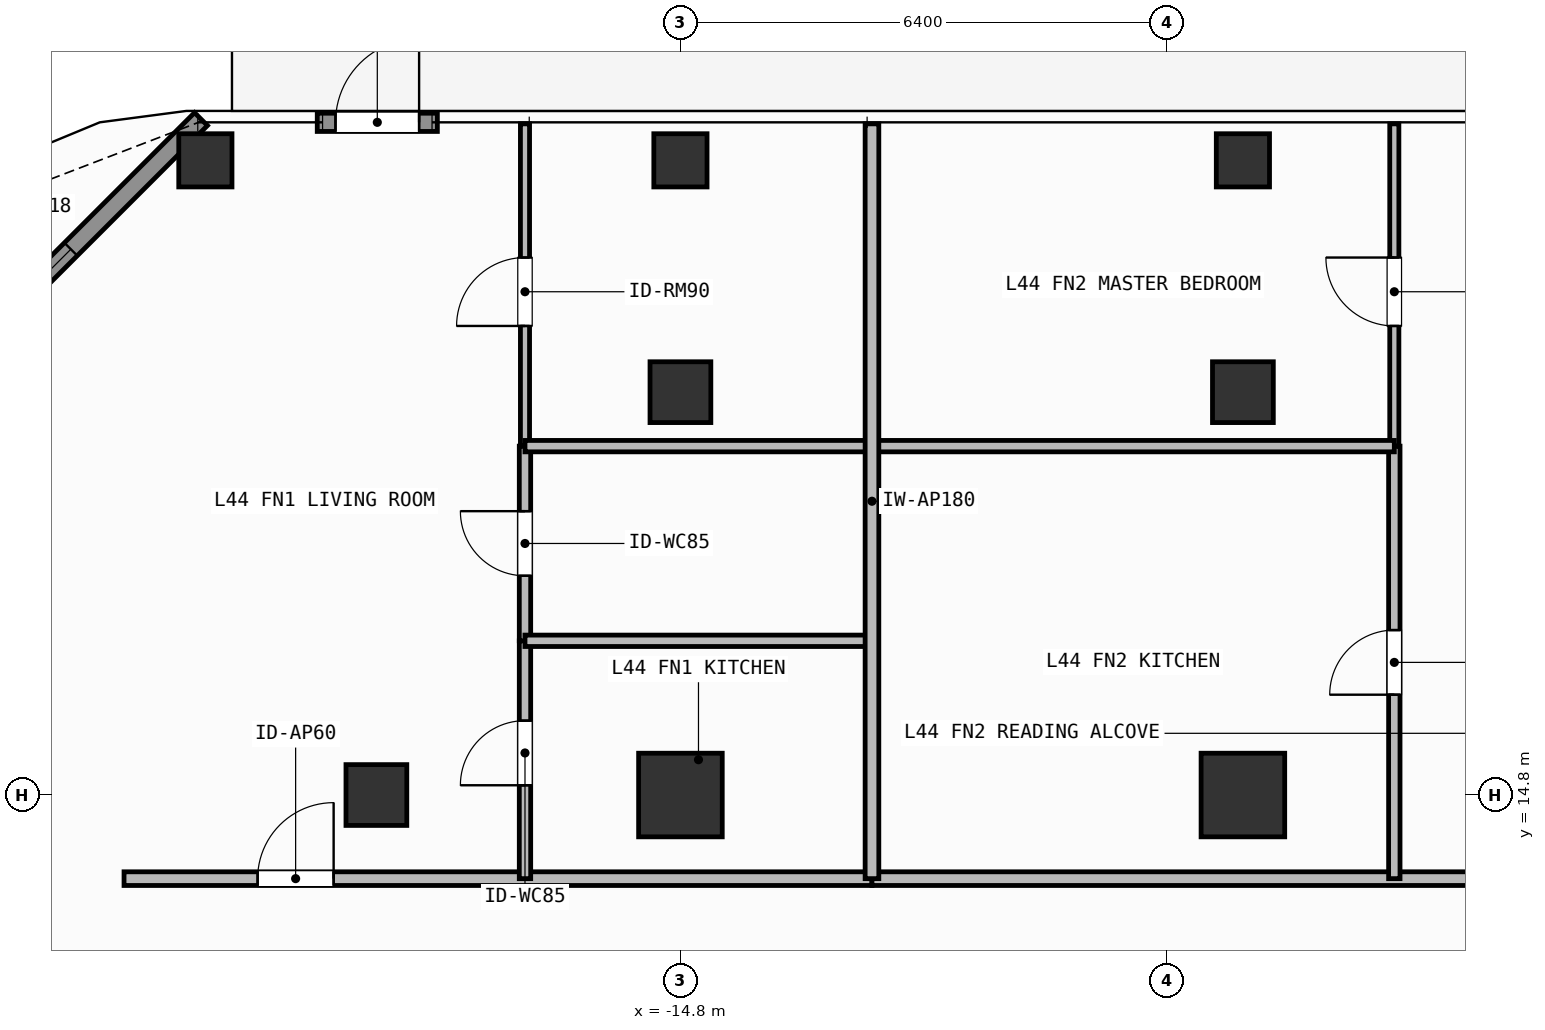
"""IFC4 building model, lengths in metres.
Left out: names, types, materials, properties, quantities, classifications, styles, units other than length and angle.
Written with IfcOpenShell. Run it as: python <this file> out.ifc"""

import sys

from ifc_helpers import new_model, si_unit, direction, frame, frame_2d, origin, origin_2d, place, context, subcontext, project, spatial, rectangle, hollow_rectangle, extrude, element, fill, save


model = new_model("IFC4")
c1 = context("Model", 3, precision=1e-05, world=origin(), true_north=direction((0.0, 1.0)))
c2 = subcontext(c1, "Body", "Model", "MODEL_VIEW")
j1 = project(units=[si_unit("LENGTHUNIT", "METRE"), si_unit("PLANEANGLEUNIT", "RADIAN")], contexts=[c1])
p1 = place(None, origin())
s1 = spatial("IfcSite", under=j1, at=p1, CompositionType="ELEMENT")
p2 = place(p1, origin())
s2 = spatial("IfcBuilding", under=s1, at=p2, CompositionType="ELEMENT")
p3 = place(p2, frame((0.0, 0.0, 179.7)))
s3 = spatial("IfcBuildingStorey", under=s2, at=p3, CompositionType="ELEMENT", Elevation=179.7)
for number, where, z_axis, x_axis in (
    (1, (-14.8, 14.8, 0.0), (0.0, 0.0, 1.0), (1.0, 0.0, 0.0)),
    (2, (-7.4, 14.8, 0.0), (0.0, 0.0, 1.0), (1.0, 0.0, 0.0)),
):
    element("IfcColumn", number, at=place(p3, frame(where, z_axis=z_axis, x_axis=x_axis)), inside=s3, PredefinedType="COLUMN", context=c2, shape_type="SweptSolid", body=[
        extrude(rectangle(XDim=1.1, YDim=1.1, at=origin_2d()), origin(), (0.0, 0.0, 1.0), 3.9),
    ])
for number, where, z_axis, x_axis in (
    (3, (-18.8, 14.8, 0.0), (0.0, 0.0, 1.0), (1.0, 0.0, 0.0)),
    (4, (-14.8, 20.1, 0.0), (0.0, 0.0, 1.0), (1.0, 0.0, 0.0)),
    (5, (-7.4, 20.1, 0.0), (0.0, 0.0, 1.0), (1.0, 0.0, 0.0)),
):
    element("IfcColumn", number, at=place(p3, frame(where, z_axis=z_axis, x_axis=x_axis)), inside=s3, PredefinedType="COLUMN", context=c2, shape_type="SweptSolid", body=[
        extrude(hollow_rectangle(XDim=0.8, YDim=0.8, WallThickness=0.036, at=origin_2d()), origin(), (0.0, 0.0, 1.0), 3.9),
    ])
for number, where, z_axis, x_axis in (
    (6, (-21.05, 23.15, 0.0), (0.0, 0.0, 1.0), (1.0, 0.0, 0.0)),
    (7, (-14.8, 23.15, 0.0), (0.0, 0.0, 1.0), (1.0, 0.0, 0.0)),
    (8, (-7.4, 23.15, 0.0), (0.0, 0.0, 1.0), (1.0, 0.0, 0.0)),
):
    element("IfcColumn", number, at=place(p3, frame(where, z_axis=z_axis, x_axis=x_axis)), inside=s3, PredefinedType="COLUMN", context=c2, shape_type="SweptSolid", body=[
        extrude(hollow_rectangle(XDim=0.7, YDim=0.7, WallThickness=0.032, at=origin_2d()), origin(), (0.0, 0.0, 1.0), 3.9),
    ])
p4 = place(p3, frame((-19.578, 23.65, 0.0), z_axis=(0.0, 0.0, 1.0), x_axis=(1.0, 0.0, 0.0)))
e9 = element("IfcWall", 9, at=p4, inside=s3, PredefinedType="SOLIDWALL", context=c2, shape_type="SweptSolid", body=[
    extrude(rectangle(XDim=1.58, YDim=0.24, at=frame_2d((0.79, 0.0))), origin(), (0.0, 0.0, 1.0), 3.68),
])
p5 = place(p4, frame((0.24, 0.0, 0.0)))
e10 = element("IfcOpeningElement", 10, at=p5, cuts=e9, PredefinedType="OPENING", context=c2, shape_type="SweptSolid", body=[
    extrude(rectangle(XDim=1.1, YDim=2.2, at=frame_2d((0.55, 1.1))), frame((0.0, 0.13, 0.0), z_axis=(0.0, -1.0, 0.0), x_axis=(1.0, 0.0, 0.0)), (0.0, 0.0, 1.0), 0.26),
])
p6 = place(p3, frame((-25.592, 19.208, 0.0), z_axis=(0.0, 0.0, 1.0), x_axis=(0.707087534163, 0.707126027686, 0.0)))
e11 = element("IfcWall", 11, at=p6, inside=s3, PredefinedType="SOLIDWALL", context=c2, shape_type="SweptSolid", body=[
    extrude(rectangle(XDim=6.342, YDim=0.24, at=frame_2d((3.171, 0.0))), origin(), (0.0, 0.0, 1.0), 3.68),
])
p7 = place(p6, frame((2.421, 0.0, 0.8)))
e12 = element("IfcOpeningElement", 12, at=p7, cuts=e11, PredefinedType="OPENING", context=c2, shape_type="SweptSolid", body=[
    extrude(rectangle(XDim=1.5, YDim=1.85, at=frame_2d((0.75, 0.925))), frame((0.0, 0.13, 0.0), z_axis=(0.0, -1.0, 0.0), x_axis=(1.0, 0.0, 0.0)), (0.0, 0.0, 1.0), 0.26),
])
p8 = place(p3, frame((-22.12, 13.7, 0.0), z_axis=(0.0, 0.0, 1.0), x_axis=(1.0, 0.0, 0.0)))
e13 = element("IfcWall", 13, at=p8, inside=s3, PredefinedType="PARTITIONING", context=c2, shape_type="SweptSolid", body=[
    extrude(rectangle(XDim=9.84, YDim=0.18, at=frame_2d((4.92, 0.0))), origin(), (0.0, 0.0, 1.0), 3.68),
])
p9 = place(p8, frame((1.758, 0.0, 0.0)))
e14 = element("IfcOpeningElement", 14, at=p9, cuts=e13, PredefinedType="OPENING", context=c2, shape_type="SweptSolid", body=[
    extrude(rectangle(XDim=1.0, YDim=2.2, at=frame_2d((0.5, 1.1))), frame((0.0, 0.1, 0.0), z_axis=(0.0, -1.0, 0.0), x_axis=(1.0, 0.0, 0.0)), (0.0, 0.0, 1.0), 0.2),
])
p10 = place(p3, frame((-16.845, 13.7, 0.0), z_axis=(0.0, 0.0, 1.0), x_axis=(0.0, 1.0, 0.0)))
e15 = element("IfcWall", 15, at=p10, inside=s3, PredefinedType="PARTITIONING", context=c2, shape_type="SweptSolid", body=[
    extrude(rectangle(XDim=3.129, YDim=0.15, at=frame_2d((1.564, 0.0))), origin(), (0.0, 0.0, 1.0), 3.68),
])
p11 = place(p10, frame((1.229, 0.0, 0.0)))
e16 = element("IfcOpeningElement", 16, at=p11, cuts=e15, PredefinedType="OPENING", context=c2, shape_type="SweptSolid", body=[
    extrude(rectangle(XDim=0.85, YDim=2.1, at=frame_2d((0.425, 1.05))), frame((0.0, 0.085, 0.0), z_axis=(0.0, -1.0, 0.0), x_axis=(1.0, 0.0, 0.0)), (0.0, 0.0, 1.0), 0.17),
])
p12 = place(p3, frame((-16.845, 16.829, 0.0), z_axis=(0.0, 0.0, 1.0), x_axis=(0.0, 1.0, 0.0)))
e17 = element("IfcWall", 17, at=p12, inside=s3, PredefinedType="PARTITIONING", context=c2, shape_type="SweptSolid", body=[
    extrude(rectangle(XDim=2.561, YDim=0.15, at=frame_2d((1.28, 0.0))), origin(), (0.0, 0.0, 1.0), 3.68),
])
p13 = place(p12, frame((0.855, 0.0, 0.0)))
e18 = element("IfcOpeningElement", 18, at=p13, cuts=e17, PredefinedType="OPENING", context=c2, shape_type="SweptSolid", body=[
    extrude(rectangle(XDim=0.85, YDim=2.1, at=frame_2d((0.425, 1.05))), frame((0.0, 0.085, 0.0), z_axis=(0.0, -1.0, 0.0), x_axis=(1.0, 0.0, 0.0)), (0.0, 0.0, 1.0), 0.17),
])
p14 = place(p3, frame((-16.845, 19.39, 0.0), z_axis=(0.0, 0.0, 1.0), x_axis=(0.0, 1.0, 0.0)))
e19 = element("IfcWall", 19, at=p14, inside=s3, PredefinedType="PARTITIONING", context=c2, shape_type="SweptSolid", body=[
    extrude(rectangle(XDim=4.24, YDim=0.12, at=frame_2d((2.12, 0.0))), origin(), (0.0, 0.0, 1.0), 3.68),
])
p15 = place(p14, frame((1.581, 0.0, 0.0)))
e20 = element("IfcOpeningElement", 20, at=p15, cuts=e19, PredefinedType="OPENING", context=c2, shape_type="SweptSolid", body=[
    extrude(rectangle(XDim=0.9, YDim=2.1, at=frame_2d((0.45, 1.05))), frame((0.0, 0.07, 0.0), z_axis=(0.0, -1.0, 0.0), x_axis=(1.0, 0.0, 0.0)), (0.0, 0.0, 1.0), 0.14),
])
p16 = place(p3, frame((-12.28, 13.7, 0.0), z_axis=(0.0, 0.0, 1.0), x_axis=(1.0, 0.0, 0.0)))
e21 = element("IfcWall", 21, at=p16, inside=s3, PredefinedType="PARTITIONING", context=c2, shape_type="SweptSolid", body=[
    extrude(rectangle(XDim=18.758, YDim=0.18, at=frame_2d((9.379, 0.0))), origin(), (0.0, 0.0, 1.0), 3.68),
])
p17 = place(p16, frame((10.048, 0.0, 0.0)))
e22 = element("IfcOpeningElement", 22, at=p17, cuts=e21, PredefinedType="OPENING", context=c2, shape_type="SweptSolid", body=[
    extrude(rectangle(XDim=1.0, YDim=2.2, at=frame_2d((0.5, 1.1))), frame((0.0, 0.1, 0.0), z_axis=(0.0, -1.0, 0.0), x_axis=(1.0, 0.0, 0.0)), (0.0, 0.0, 1.0), 0.2),
])
p18 = place(p3, frame((-5.408, 13.7, 0.0), z_axis=(0.0, 0.0, 1.0), x_axis=(0.0, 1.0, 0.0)))
e23 = element("IfcWall", 23, at=p18, inside=s3, PredefinedType="PARTITIONING", context=c2, shape_type="SweptSolid", body=[
    extrude(rectangle(XDim=5.69, YDim=0.15, at=frame_2d((2.845, 0.0))), origin(), (0.0, 0.0, 1.0), 3.68),
])
p19 = place(p18, frame((2.42, 0.0, 0.0)))
e24 = element("IfcOpeningElement", 24, at=p19, cuts=e23, PredefinedType="OPENING", context=c2, shape_type="SweptSolid", body=[
    extrude(rectangle(XDim=0.85, YDim=2.1, at=frame_2d((0.425, 1.05))), frame((0.0, 0.085, 0.0), z_axis=(0.0, -1.0, 0.0), x_axis=(1.0, 0.0, 0.0)), (0.0, 0.0, 1.0), 0.17),
])
p20 = place(p3, frame((-5.408, 19.39, 0.0), z_axis=(0.0, 0.0, 1.0), x_axis=(0.0, 1.0, 0.0)))
e25 = element("IfcWall", 25, at=p20, inside=s3, PredefinedType="PARTITIONING", context=c2, shape_type="SweptSolid", body=[
    extrude(rectangle(XDim=4.24, YDim=0.12, at=frame_2d((2.12, 0.0))), origin(), (0.0, 0.0, 1.0), 3.68),
])
p21 = place(p20, frame((1.581, 0.0, 0.0)))
e26 = element("IfcOpeningElement", 26, at=p21, cuts=e25, PredefinedType="OPENING", context=c2, shape_type="SweptSolid", body=[
    extrude(rectangle(XDim=0.9, YDim=2.1, at=frame_2d((0.45, 1.05))), frame((0.0, 0.07, 0.0), z_axis=(0.0, -1.0, 0.0), x_axis=(1.0, 0.0, 0.0)), (0.0, 0.0, 1.0), 0.14),
])
for number, where, z_axis, x_axis in (
    (27, (-16.845, 16.829, 0.0), (0.0, 0.0, 1.0), (1.0, 0.0, 0.0)),
    (28, (-16.845, 19.39, 0.0), (0.0, 0.0, 1.0), (1.0, 0.0, 0.0)),
):
    element("IfcWall", number, at=place(p3, frame(where, z_axis=z_axis, x_axis=x_axis)), inside=s3, PredefinedType="PARTITIONING", context=c2, shape_type="SweptSolid", body=[
        extrude(rectangle(XDim=4.565, YDim=0.15, at=frame_2d((2.282, 0.0))), origin(), (0.0, 0.0, 1.0), 3.68),
    ])
p22 = place(p3, frame((-12.28, 19.39, 0.0), z_axis=(0.0, 0.0, 1.0), x_axis=(1.0, 0.0, 0.0)))
e29 = element("IfcWall", 29, at=p22, inside=s3, PredefinedType="PARTITIONING", context=c2, shape_type="SweptSolid", body=[
    extrude(rectangle(XDim=6.872, YDim=0.15, at=frame_2d((3.436, 0.0))), origin(), (0.0, 0.0, 1.0), 3.68),
])
p23 = place(p3, frame((-12.28, 13.7, 0.0), z_axis=(0.0, 0.0, 1.0), x_axis=(0.0, 1.0, 0.0)))
e30 = element("IfcWall", 30, at=p23, inside=s3, PredefinedType="PARTITIONING", context=c2, shape_type="SweptSolid", body=[
    extrude(rectangle(XDim=9.93, YDim=0.18, at=frame_2d((4.965, 0.0))), origin(), (0.0, 0.0, 1.0), 3.68),
])
p24 = place(p5, origin())
e31 = element("IfcDoor", 31, at=p24, inside=s3, OperationType="SINGLE_SWING_RIGHT", PredefinedType="DOOR", context=c2, shape_type="SweptSolid", body=[
    extrude(rectangle(XDim=1.1, YDim=2.2, at=frame_2d((0.55, 1.1))), frame((0.0, 0.025, 0.0), z_axis=(0.0, -1.0, 0.0), x_axis=(1.0, 0.0, 0.0)), (0.0, 0.0, 1.0), 0.05),
])
fill(e10, e31)
p25 = place(p7, origin())
e32 = element("IfcWindow", 32, at=p25, inside=s3, PartitioningType="SINGLE_PANEL", PredefinedType="WINDOW", context=c2, shape_type="SweptSolid", body=[
    extrude(rectangle(XDim=1.5, YDim=1.85, at=frame_2d((0.75, 0.925))), frame((0.0, 0.03, 0.0), z_axis=(0.0, -1.0, 0.0), x_axis=(1.0, 0.0, 0.0)), (0.0, 0.0, 1.0), 0.06),
])
fill(e12, e32)
p26 = place(p9, origin())
e33 = element("IfcDoor", 33, at=p26, inside=s3, OperationType="SINGLE_SWING_RIGHT", PredefinedType="DOOR", context=c2, shape_type="SweptSolid", body=[
    extrude(rectangle(XDim=1.0, YDim=2.2, at=frame_2d((0.5, 1.1))), frame((0.0, 0.025, 0.0), z_axis=(0.0, -1.0, 0.0), x_axis=(1.0, 0.0, 0.0)), (0.0, 0.0, 1.0), 0.05),
])
fill(e14, e33)
p27 = place(p11, origin())
e34 = element("IfcDoor", 34, at=p27, inside=s3, OperationType="SINGLE_SWING_LEFT", PredefinedType="DOOR", context=c2, shape_type="SweptSolid", body=[
    extrude(rectangle(XDim=0.85, YDim=2.1, at=frame_2d((0.425, 1.05))), frame((0.0, 0.025, 0.0), z_axis=(0.0, -1.0, 0.0), x_axis=(1.0, 0.0, 0.0)), (0.0, 0.0, 1.0), 0.05),
])
fill(e16, e34)
p28 = place(p13, origin())
e35 = element("IfcDoor", 35, at=p28, inside=s3, OperationType="SINGLE_SWING_RIGHT", PredefinedType="DOOR", context=c2, shape_type="SweptSolid", body=[
    extrude(rectangle(XDim=0.85, YDim=2.1, at=frame_2d((0.425, 1.05))), frame((0.0, 0.025, 0.0), z_axis=(0.0, -1.0, 0.0), x_axis=(1.0, 0.0, 0.0)), (0.0, 0.0, 1.0), 0.05),
])
fill(e18, e35)
p29 = place(p15, origin())
e36 = element("IfcDoor", 36, at=p29, inside=s3, OperationType="SINGLE_SWING_LEFT", PredefinedType="DOOR", context=c2, shape_type="SweptSolid", body=[
    extrude(rectangle(XDim=0.9, YDim=2.1, at=frame_2d((0.45, 1.05))), frame((0.0, 0.025, 0.0), z_axis=(0.0, -1.0, 0.0), x_axis=(1.0, 0.0, 0.0)), (0.0, 0.0, 1.0), 0.05),
])
fill(e20, e36)
p30 = place(p19, origin())
e37 = element("IfcDoor", 37, at=p30, inside=s3, OperationType="SINGLE_SWING_LEFT", PredefinedType="DOOR", context=c2, shape_type="SweptSolid", body=[
    extrude(rectangle(XDim=0.85, YDim=2.1, at=frame_2d((0.425, 1.05))), frame((0.0, 0.025, 0.0), z_axis=(0.0, -1.0, 0.0), x_axis=(1.0, 0.0, 0.0)), (0.0, 0.0, 1.0), 0.05),
])
fill(e24, e37)
p31 = place(p21, origin())
e38 = element("IfcDoor", 38, at=p31, inside=s3, OperationType="SINGLE_SWING_RIGHT", PredefinedType="DOOR", context=c2, shape_type="SweptSolid", body=[
    extrude(rectangle(XDim=0.9, YDim=2.1, at=frame_2d((0.45, 1.05))), frame((0.0, 0.025, 0.0), z_axis=(0.0, -1.0, 0.0), x_axis=(1.0, 0.0, 0.0)), (0.0, 0.0, 1.0), 0.05),
])
fill(e26, e38)
save(model, sys.argv[1])
